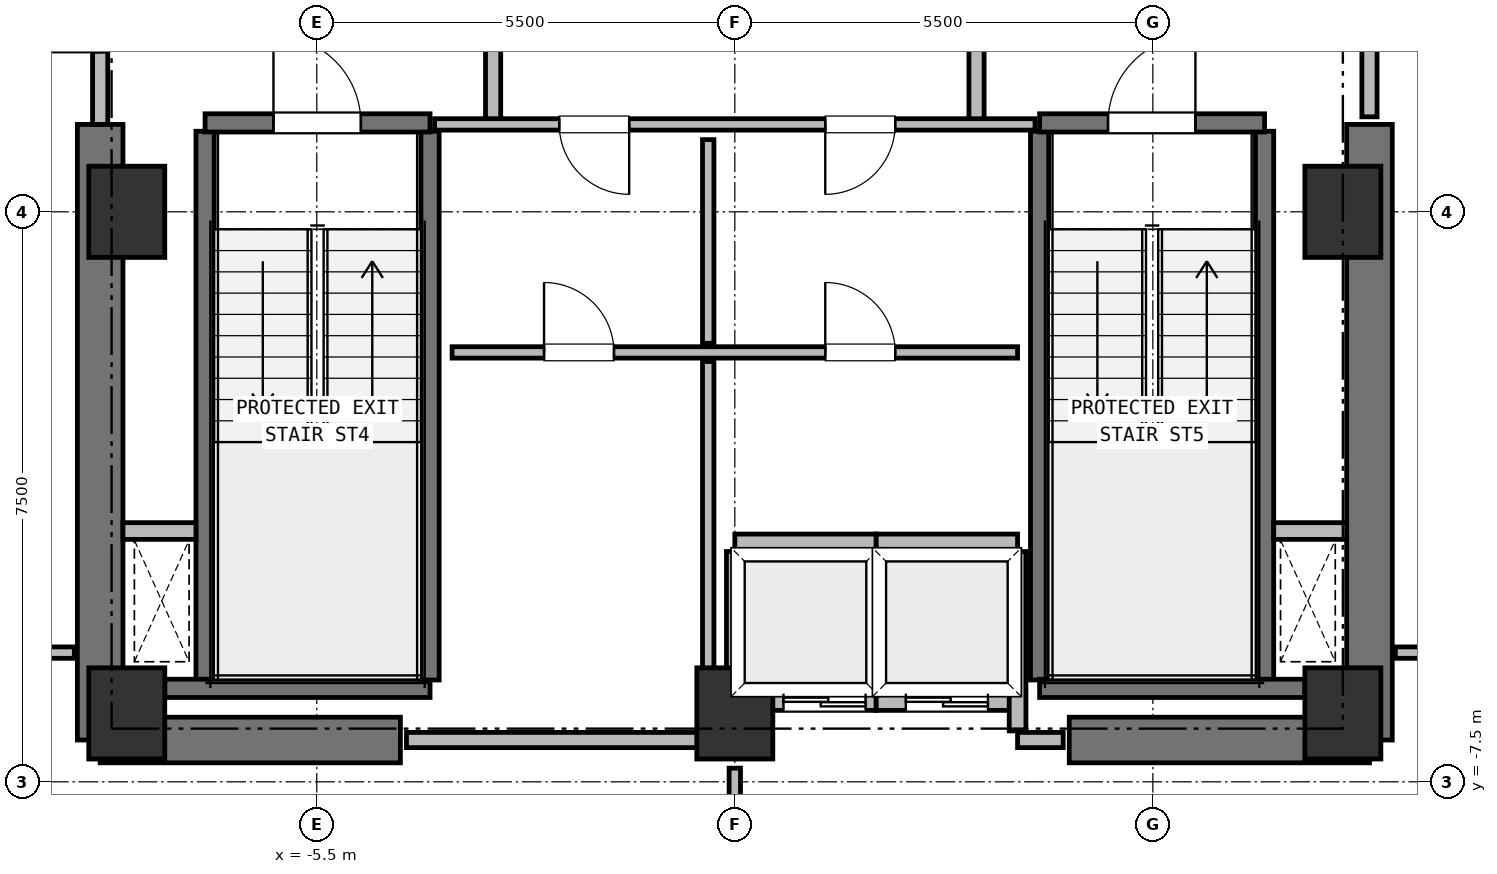
"""IFC4 building model, lengths in metres.
Left out: names, types, materials, properties, quantities, classifications, styles, units other than length and angle.
Written with IfcOpenShell. Run it as: python <this file> out.ifc"""

import sys

from ifc_helpers import new_model, si_unit, direction, frame, frame_2d, origin, origin_2d, place, context, subcontext, project, spatial, rectangle, extrude, element, fill, save


model = new_model("IFC4")
c1 = context("Model", 3, precision=1e-05, world=origin(), true_north=direction((0.0, 1.0)))
c2 = subcontext(c1, "Body", "Model", "MODEL_VIEW")
j1 = project(units=[si_unit("LENGTHUNIT", "METRE"), si_unit("PLANEANGLEUNIT", "RADIAN")], contexts=[c1])
p1 = place(None, origin())
s1 = spatial("IfcSite", under=j1, at=p1, CompositionType="ELEMENT")
p2 = place(p1, origin())
s2 = spatial("IfcBuilding", under=s1, at=p2, CompositionType="ELEMENT")
p3 = place(p2, frame((0.0, 0.0, 164.75)))
s3 = spatial("IfcBuildingStorey", under=s2, at=p3, CompositionType="ELEMENT", Elevation=164.75)
for number, where, z_axis, x_axis in (
    (1, (-8.0, -6.6, 0.0), (0.0, 0.0, 1.0), (1.0, 0.0, 0.0)),
    (2, (0.0, -6.6, 0.0), (0.0, 0.0, 1.0), (1.0, 0.0, 0.0)),
    (3, (8.0, -6.6, 0.0), (0.0, 0.0, 1.0), (1.0, 0.0, 0.0)),
    (4, (8.0, 0.0, 0.0), (0.0, 0.0, 1.0), (1.0, 0.0, 0.0)),
    (5, (-8.0, 0.0, 0.0), (0.0, 0.0, 1.0), (1.0, 0.0, 0.0)),
):
    element("IfcColumn", number, at=place(p3, frame(where, z_axis=z_axis, x_axis=x_axis)), inside=s3, PredefinedType="COLUMN", context=c2, shape_type="SweptSolid", body=[
        extrude(rectangle(XDim=1.0, YDim=1.2, at=origin_2d()), origin(), (0.0, 0.0, 1.0), 3.75),
    ])
for number, where, z_axis, x_axis in (
    (6, (-8.35, -6.95, 0.0), (0.0, 0.0, 1.0), (1.0, 0.0, 0.0)),
    (7, (4.4, -6.95, 0.0), (0.0, 0.0, 1.0), (1.0, 0.0, 0.0)),
):
    element("IfcWall", number, at=place(p3, frame(where, z_axis=z_axis, x_axis=x_axis)), inside=s3, PredefinedType="SHEAR", context=c2, shape_type="SweptSolid", body=[
        extrude(rectangle(XDim=3.95, YDim=0.6, at=frame_2d((1.975, 0.0))), origin(), (0.0, 0.0, 1.0), 3.44),
    ])
for number, where, z_axis, x_axis in (
    (8, (-8.35, -6.95, 0.0), (0.0, 0.0, 1.0), (0.0, 1.0, 0.0)),
    (9, (8.35, -6.95, 0.0), (0.0, 0.0, 1.0), (0.0, 1.0, 0.0)),
):
    element("IfcWall", number, at=place(p3, frame(where, z_axis=z_axis, x_axis=x_axis)), inside=s3, PredefinedType="SHEAR", context=c2, shape_type="SweptSolid", body=[
        extrude(rectangle(XDim=8.1, YDim=0.6, at=frame_2d((4.05, 0.0))), origin(), (0.0, 0.0, 1.0), 3.44),
    ])
p4 = place(p3, frame((-6.97, -6.16, 0.0), z_axis=(0.0, 0.0, 1.0), x_axis=(0.0, 1.0, 0.0)))
e10 = element("IfcWall", 10, at=p4, inside=s3, PredefinedType="SHEAR", context=c2, shape_type="SweptSolid", body=[
    extrude(rectangle(XDim=7.22, YDim=0.24, at=frame_2d((3.61, 0.0))), origin(), (0.0, 0.0, 1.0), 3.44),
])
p5 = place(p3, frame((-7.5, -6.27, 0.0), z_axis=(0.0, 0.0, 1.0), x_axis=(1.0, 0.0, 0.0)))
e11 = element("IfcWall", 11, at=p5, inside=s3, PredefinedType="SHEAR", context=c2, shape_type="SweptSolid", body=[
    extrude(rectangle(XDim=3.49, YDim=0.24, at=frame_2d((1.745, 0.0))), origin(), (0.0, 0.0, 1.0), 3.44),
])
p6 = place(p3, frame((-4.01, -6.16, 0.0), z_axis=(0.0, 0.0, 1.0), x_axis=(0.0, 1.0, 0.0)))
e12 = element("IfcWall", 12, at=p6, inside=s3, PredefinedType="SHEAR", context=c2, shape_type="SweptSolid", body=[
    extrude(rectangle(XDim=7.22, YDim=0.24, at=frame_2d((3.61, 0.0))), origin(), (0.0, 0.0, 1.0), 3.44),
])
p7 = place(p3, frame((-6.97, 1.17, 0.0), z_axis=(0.0, 0.0, 1.0), x_axis=(1.0, 0.0, 0.0)))
e13 = element("IfcWall", 13, at=p7, inside=s3, PredefinedType="SHEAR", context=c2, shape_type="SweptSolid", body=[
    extrude(rectangle(XDim=2.96, YDim=0.24, at=frame_2d((1.48, 0.0))), origin(), (0.0, 0.0, 1.0), 3.44),
])
p8 = place(p7, frame((0.9, 0.0, 0.0)))
e14 = element("IfcOpeningElement", 14, at=p8, cuts=e13, PredefinedType="OPENING", context=c2, shape_type="SweptSolid", body=[
    extrude(rectangle(XDim=1.15, YDim=2.15, at=frame_2d((0.575, 1.075))), frame((0.0, 0.13, 0.0), z_axis=(0.0, -1.0, 0.0), x_axis=(1.0, 0.0, 0.0)), (0.0, 0.0, 1.0), 0.26),
])
for number, where, z_axis, x_axis in (
    (15, (4.01, -6.16, 0.0), (0.0, 0.0, 1.0), (0.0, 1.0, 0.0)),
    (16, (6.97, -6.16, 0.0), (0.0, 0.0, 1.0), (0.0, 1.0, 0.0)),
):
    element("IfcWall", number, at=place(p3, frame(where, z_axis=z_axis, x_axis=x_axis)), inside=s3, PredefinedType="SHEAR", context=c2, shape_type="SweptSolid", body=[
        extrude(rectangle(XDim=7.22, YDim=0.24, at=frame_2d((3.61, 0.0))), origin(), (0.0, 0.0, 1.0), 3.44),
    ])
p9 = place(p3, frame((4.01, -6.27, 0.0), z_axis=(0.0, 0.0, 1.0), x_axis=(1.0, 0.0, 0.0)))
e17 = element("IfcWall", 17, at=p9, inside=s3, PredefinedType="SHEAR", context=c2, shape_type="SweptSolid", body=[
    extrude(rectangle(XDim=3.49, YDim=0.24, at=frame_2d((1.745, 0.0))), origin(), (0.0, 0.0, 1.0), 3.44),
])
p10 = place(p3, frame((4.01, 1.17, 0.0), z_axis=(0.0, 0.0, 1.0), x_axis=(1.0, 0.0, 0.0)))
e18 = element("IfcWall", 18, at=p10, inside=s3, PredefinedType="SHEAR", context=c2, shape_type="SweptSolid", body=[
    extrude(rectangle(XDim=2.96, YDim=0.24, at=frame_2d((1.48, 0.0))), origin(), (0.0, 0.0, 1.0), 3.44),
])
p11 = place(p10, frame((0.9, 0.0, 0.0)))
e19 = element("IfcOpeningElement", 19, at=p11, cuts=e18, PredefinedType="OPENING", context=c2, shape_type="SweptSolid", body=[
    extrude(rectangle(XDim=1.15, YDim=2.15, at=frame_2d((0.575, 1.075))), frame((0.0, 0.13, 0.0), z_axis=(0.0, -1.0, 0.0), x_axis=(1.0, 0.0, 0.0)), (0.0, 0.0, 1.0), 0.26),
])
for number, where, z_axis, x_axis in (
    (20, (-8.05, -4.2, 0.0), (0.0, 0.0, 1.0), (1.0, 0.0, 0.0)),
    (21, (7.09, -4.2, 0.0), (0.0, 0.0, 1.0), (1.0, 0.0, 0.0)),
):
    element("IfcWall", number, at=place(p3, frame(where, z_axis=z_axis, x_axis=x_axis)), inside=s3, PredefinedType="PARTITIONING", context=c2, shape_type="SweptSolid", body=[
        extrude(rectangle(XDim=0.96, YDim=0.22, at=frame_2d((0.48, 0.0))), origin(), (0.0, 0.0, 1.0), 3.44),
    ])
p12 = place(p3, frame((0.0, -6.45, 0.0), z_axis=(0.0, 0.0, 1.0), x_axis=(1.0, 0.0, 0.0)))
e22 = element("IfcWall", 22, at=p12, inside=s3, PredefinedType="PARTITIONING", context=c2, shape_type="SweptSolid", body=[
    extrude(rectangle(XDim=1.86, YDim=0.22, at=frame_2d((0.93, 0.0))), origin(), (0.0, 0.0, 1.0), 3.06),
])
p13 = place(p12, frame((0.64, 0.0, 0.0)))
e23 = element("IfcOpeningElement", 23, at=p13, cuts=e22, PredefinedType="OPENING", context=c2, shape_type="SweptSolid", body=[
    extrude(rectangle(XDim=1.08, YDim=2.15, at=frame_2d((0.54, 1.075))), frame((0.0, 0.12, 0.0), z_axis=(0.0, -1.0, 0.0), x_axis=(1.0, 0.0, 0.0)), (0.0, 0.0, 1.0), 0.24),
])
for number, where, z_axis, x_axis in (
    (24, (0.0, -4.35, 0.0), (0.0, 0.0, 1.0), (1.0, 0.0, 0.0)),
    (25, (0.0, -6.33, 0.0), (0.0, 0.0, 1.0), (0.0, 1.0, 0.0)),
    (26, (1.86, -6.33, 0.0), (0.0, 0.0, 1.0), (0.0, 1.0, 0.0)),
):
    element("IfcWall", number, at=place(p3, frame(where, z_axis=z_axis, x_axis=x_axis)), inside=s3, PredefinedType="PARTITIONING", context=c2, shape_type="SweptSolid", body=[
        extrude(rectangle(XDim=1.86, YDim=0.22, at=frame_2d((0.93, 0.0))), origin(), (0.0, 0.0, 1.0), 3.44),
    ])
p14 = place(p3, frame((1.86, -6.45, 0.0), z_axis=(0.0, 0.0, 1.0), x_axis=(1.0, 0.0, 0.0)))
e27 = element("IfcWall", 27, at=p14, inside=s3, PredefinedType="PARTITIONING", context=c2, shape_type="SweptSolid", body=[
    extrude(rectangle(XDim=1.86, YDim=0.22, at=frame_2d((0.93, 0.0))), origin(), (0.0, 0.0, 1.0), 3.06),
])
p15 = place(p14, frame((0.39, 0.0, 0.0)))
e28 = element("IfcOpeningElement", 28, at=p15, cuts=e27, PredefinedType="OPENING", context=c2, shape_type="SweptSolid", body=[
    extrude(rectangle(XDim=1.08, YDim=2.15, at=frame_2d((0.54, 1.075))), frame((0.0, 0.12, 0.0), z_axis=(0.0, -1.0, 0.0), x_axis=(1.0, 0.0, 0.0)), (0.0, 0.0, 1.0), 0.24),
])
p16 = place(p3, frame((1.86, -4.35, 0.0), z_axis=(0.0, 0.0, 1.0), x_axis=(1.0, 0.0, 0.0)))
e29 = element("IfcWall", 29, at=p16, inside=s3, PredefinedType="PARTITIONING", context=c2, shape_type="SweptSolid", body=[
    extrude(rectangle(XDim=1.86, YDim=0.22, at=frame_2d((0.93, 0.0))), origin(), (0.0, 0.0, 1.0), 3.44),
])
p17 = place(p3, frame((3.72, -6.83, 0.0), z_axis=(0.0, 0.0, 1.0), x_axis=(0.0, 1.0, 0.0)))
e30 = element("IfcWall", 30, at=p17, inside=s3, PredefinedType="PARTITIONING", context=c2, shape_type="SweptSolid", body=[
    extrude(rectangle(XDim=2.36, YDim=0.22, at=frame_2d((1.18, 0.0))), origin(), (0.0, 0.0, 1.0), 3.44),
])
p18 = place(p3, frame((-3.18, 1.15, 0.0), z_axis=(0.0, 0.0, 1.0), x_axis=(0.0, 1.0, 0.0)))
e31 = element("IfcWall", 31, at=p18, inside=s3, PredefinedType="PARTITIONING", context=c2, shape_type="SweptSolid", body=[
    extrude(rectangle(XDim=3.3, YDim=0.2, at=frame_2d((1.65, 0.0))), origin(), (0.0, 0.0, 1.0), 3.44),
])
p19 = place(p18, frame((1.08, 0.0, 0.0)))
e32 = element("IfcOpeningElement", 32, at=p19, cuts=e31, PredefinedType="OPENING", context=c2, shape_type="SweptSolid", body=[
    extrude(rectangle(XDim=1.15, YDim=2.15, at=frame_2d((0.575, 1.075))), frame((0.0, 0.11, 0.0), z_axis=(0.0, -1.0, 0.0), x_axis=(1.0, 0.0, 0.0)), (0.0, 0.0, 1.0), 0.22),
])
p20 = place(p3, frame((3.18, 1.15, 0.0), z_axis=(0.0, 0.0, 1.0), x_axis=(0.0, 1.0, 0.0)))
e33 = element("IfcWall", 33, at=p20, inside=s3, PredefinedType="PARTITIONING", context=c2, shape_type="SweptSolid", body=[
    extrude(rectangle(XDim=3.3, YDim=0.2, at=frame_2d((1.65, 0.0))), origin(), (0.0, 0.0, 1.0), 3.44),
])
p21 = place(p20, frame((1.08, 0.0, 0.0)))
e34 = element("IfcOpeningElement", 34, at=p21, cuts=e33, PredefinedType="OPENING", context=c2, shape_type="SweptSolid", body=[
    extrude(rectangle(XDim=1.15, YDim=2.15, at=frame_2d((0.575, 1.075))), frame((0.0, 0.11, 0.0), z_axis=(0.0, -1.0, 0.0), x_axis=(1.0, 0.0, 0.0)), (0.0, 0.0, 1.0), 0.22),
])
p22 = place(p3, frame((-8.35, 1.15, 0.0), z_axis=(0.0, 0.0, 1.0), x_axis=(0.0, 1.0, 0.0)))
e35 = element("IfcWall", 35, at=p22, inside=s3, PredefinedType="PARTITIONING", context=c2, shape_type="SweptSolid", body=[
    extrude(rectangle(XDim=5.4, YDim=0.2, at=frame_2d((2.7, 0.0))), origin(), (0.0, 0.0, 1.0), 3.44),
])
p23 = place(p22, frame((0.95, 0.0, 0.0)))
e36 = element("IfcOpeningElement", 36, at=p23, cuts=e35, PredefinedType="OPENING", context=c2, shape_type="SweptSolid", body=[
    extrude(rectangle(XDim=1.15, YDim=2.15, at=frame_2d((0.575, 1.075))), frame((0.0, 0.11, 0.0), z_axis=(0.0, -1.0, 0.0), x_axis=(1.0, 0.0, 0.0)), (0.0, 0.0, 1.0), 0.22),
])
p24 = place(p3, frame((8.35, 1.25, 0.0), z_axis=(0.0, 0.0, 1.0), x_axis=(0.0, 1.0, 0.0)))
e37 = element("IfcWall", 37, at=p24, inside=s3, PredefinedType="PARTITIONING", context=c2, shape_type="SweptSolid", body=[
    extrude(rectangle(XDim=5.3, YDim=0.2, at=frame_2d((2.65, 0.0))), origin(), (0.0, 0.0, 1.0), 3.44),
])
p25 = place(p24, frame((0.95, 0.0, 0.0)))
e38 = element("IfcOpeningElement", 38, at=p25, cuts=e37, PredefinedType="OPENING", context=c2, shape_type="SweptSolid", body=[
    extrude(rectangle(XDim=1.15, YDim=2.15, at=frame_2d((0.575, 1.075))), frame((0.0, 0.11, 0.0), z_axis=(0.0, -1.0, 0.0), x_axis=(1.0, 0.0, 0.0)), (0.0, 0.0, 1.0), 0.22),
])
p26 = place(p3, frame((3.95, 1.15, 0.0), z_axis=(0.0, 0.0, 1.0), x_axis=(-1.0, 0.0, 0.0)))
e39 = element("IfcWall", 39, at=p26, inside=s3, PredefinedType="PARTITIONING", context=c2, shape_type="SweptSolid", body=[
    extrude(rectangle(XDim=7.9, YDim=0.15, at=frame_2d((3.95, 0.0))), origin(), (0.0, 0.0, 1.0), 3.44),
])
p27 = place(p26, frame((5.34, 0.0, 0.0)))
e40 = element("IfcOpeningElement", 40, at=p27, cuts=e39, PredefinedType="OPENING", context=c2, shape_type="SweptSolid", body=[
    extrude(rectangle(XDim=0.92, YDim=2.05, at=frame_2d((0.46, 1.025))), frame((0.0, 0.085, 0.0), z_axis=(0.0, -1.0, 0.0), x_axis=(1.0, 0.0, 0.0)), (0.0, 0.0, 1.0), 0.17),
])
p28 = place(p26, frame((1.84, 0.0, 0.0)))
e41 = element("IfcOpeningElement", 41, at=p28, cuts=e39, PredefinedType="OPENING", context=c2, shape_type="SweptSolid", body=[
    extrude(rectangle(XDim=0.92, YDim=2.05, at=frame_2d((0.46, 1.025))), frame((0.0, 0.085, 0.0), z_axis=(0.0, -1.0, 0.0), x_axis=(1.0, 0.0, 0.0)), (0.0, 0.0, 1.0), 0.17),
])
p29 = place(p3, frame((-4.32, -6.95, 0.0), z_axis=(0.0, 0.0, 1.0), x_axis=(1.0, 0.0, 0.0)))
e42 = element("IfcWall", 42, at=p29, inside=s3, PredefinedType="PARTITIONING", context=c2, shape_type="SweptSolid", body=[
    extrude(rectangle(XDim=4.32, YDim=0.2, at=frame_2d((2.16, 0.0))), origin(), (0.0, 0.0, 1.0), 3.44),
])
p30 = place(p3, frame((3.72, -6.95, 0.0), z_axis=(0.0, 0.0, 1.0), x_axis=(1.0, 0.0, 0.0)))
e43 = element("IfcWall", 43, at=p30, inside=s3, PredefinedType="PARTITIONING", context=c2, shape_type="SweptSolid", body=[
    extrude(rectangle(XDim=0.6, YDim=0.2, at=frame_2d((0.3, 0.0))), origin(), (0.0, 0.0, 1.0), 3.44),
])
p31 = place(p3, frame((-3.72, -1.85, 0.0), z_axis=(0.0, 0.0, 1.0), x_axis=(1.0, 0.0, 0.0)))
e44 = element("IfcWall", 44, at=p31, inside=s3, PredefinedType="PARTITIONING", context=c2, shape_type="SweptSolid", body=[
    extrude(rectangle(XDim=7.44, YDim=0.15, at=frame_2d((3.72, 0.0))), origin(), (0.0, 0.0, 1.0), 3.44),
])
p32 = place(p31, frame((1.21, 0.0, 0.0)))
e45 = element("IfcOpeningElement", 45, at=p32, cuts=e44, PredefinedType="OPENING", context=c2, shape_type="SweptSolid", body=[
    extrude(rectangle(XDim=0.92, YDim=2.05, at=frame_2d((0.46, 1.025))), frame((0.0, 0.085, 0.0), z_axis=(0.0, -1.0, 0.0), x_axis=(1.0, 0.0, 0.0)), (0.0, 0.0, 1.0), 0.17),
])
p33 = place(p31, frame((4.91, 0.0, 0.0)))
e46 = element("IfcOpeningElement", 46, at=p33, cuts=e44, PredefinedType="OPENING", context=c2, shape_type="SweptSolid", body=[
    extrude(rectangle(XDim=0.92, YDim=2.05, at=frame_2d((0.46, 1.025))), frame((0.0, 0.085, 0.0), z_axis=(0.0, -1.0, 0.0), x_axis=(1.0, 0.0, 0.0)), (0.0, 0.0, 1.0), 0.17),
])
p34 = place(p3, frame((-0.35, -6.58, 0.0), z_axis=(0.0, 0.0, 1.0), x_axis=(0.0, 1.0, 0.0)))
e47 = element("IfcWall", 47, at=p34, inside=s3, PredefinedType="PARTITIONING", context=c2, shape_type="SweptSolid", body=[
    extrude(rectangle(XDim=4.61, YDim=0.15, at=frame_2d((2.305, 0.0))), origin(), (0.0, 0.0, 1.0), 3.44),
])
p35 = place(p3, frame((-0.35, -1.73, 0.0), z_axis=(0.0, 0.0, 1.0), x_axis=(0.0, 1.0, 0.0)))
e48 = element("IfcWall", 48, at=p35, inside=s3, PredefinedType="PARTITIONING", context=c2, shape_type="SweptSolid", body=[
    extrude(rectangle(XDim=2.68, YDim=0.15, at=frame_2d((1.34, 0.0))), origin(), (0.0, 0.0, 1.0), 3.44),
])
p36 = place(p3, frame((-8.69, -5.8, 0.0), z_axis=(0.0, 0.0, 1.0), x_axis=(-1.0, 0.0, 0.0)))
e49 = element("IfcWall", 49, at=p36, inside=s3, PredefinedType="PARTITIONING", context=c2, shape_type="SweptSolid", body=[
    extrude(rectangle(XDim=2.02, YDim=0.15, at=frame_2d((1.01, 0.0))), origin(), (0.0, 0.0, 1.0), 3.44),
])
p37 = place(p36, frame((0.55, 0.0, 0.0)))
e50 = element("IfcOpeningElement", 50, at=p37, cuts=e49, PredefinedType="OPENING", context=c2, shape_type="SweptSolid", body=[
    extrude(rectangle(XDim=1.0, YDim=2.15, at=frame_2d((0.5, 1.075))), frame((0.0, 0.085, 0.0), z_axis=(0.0, -1.0, 0.0), x_axis=(1.0, 0.0, 0.0)), (0.0, 0.0, 1.0), 0.17),
])
p38 = place(p3, frame((10.71, -5.8, 0.0), z_axis=(0.0, 0.0, 1.0), x_axis=(-1.0, 0.0, 0.0)))
e51 = element("IfcWall", 51, at=p38, inside=s3, PredefinedType="PARTITIONING", context=c2, shape_type="SweptSolid", body=[
    extrude(rectangle(XDim=2.02, YDim=0.15, at=frame_2d((1.01, 0.0))), origin(), (0.0, 0.0, 1.0), 3.44),
])
p39 = place(p38, frame((0.55, 0.0, 0.0)))
e52 = element("IfcOpeningElement", 52, at=p39, cuts=e51, PredefinedType="OPENING", context=c2, shape_type="SweptSolid", body=[
    extrude(rectangle(XDim=1.0, YDim=2.15, at=frame_2d((0.5, 1.075))), frame((0.0, 0.085, 0.0), z_axis=(0.0, -1.0, 0.0), x_axis=(1.0, 0.0, 0.0)), (0.0, 0.0, 1.0), 0.17),
])
p40 = place(p3, frame((0.0, -7.32, 0.0), z_axis=(0.0, 0.0, 1.0), x_axis=(0.0, -1.0, 0.0)))
e53 = element("IfcWall", 53, at=p40, inside=s3, PredefinedType="PARTITIONING", context=c2, shape_type="SweptSolid", body=[
    extrude(rectangle(XDim=13.287, YDim=0.15, at=frame_2d((6.644, 0.0))), origin(), (0.0, 0.0, 1.0), 3.44),
])
p41 = place(p8, origin())
e54 = element("IfcDoor", 54, at=p41, inside=s3, OperationType="SINGLE_SWING_LEFT", PredefinedType="DOOR", context=c2, shape_type="SweptSolid", body=[
    extrude(rectangle(XDim=1.15, YDim=2.15, at=frame_2d((0.575, 1.075))), frame((0.0, 0.025, 0.0), z_axis=(0.0, -1.0, 0.0), x_axis=(1.0, 0.0, 0.0)), (0.0, 0.0, 1.0), 0.05),
])
fill(e14, e54)
p42 = place(p11, origin())
e55 = element("IfcDoor", 55, at=p42, inside=s3, OperationType="SINGLE_SWING_RIGHT", PredefinedType="DOOR", context=c2, shape_type="SweptSolid", body=[
    extrude(rectangle(XDim=1.15, YDim=2.15, at=frame_2d((0.575, 1.075))), frame((0.0, 0.025, 0.0), z_axis=(0.0, -1.0, 0.0), x_axis=(1.0, 0.0, 0.0)), (0.0, 0.0, 1.0), 0.05),
])
fill(e19, e55)
p43 = place(p13, origin())
e56 = element("IfcDoor", 56, at=p43, inside=s3, OperationType="DOUBLE_DOOR_SLIDING", PredefinedType="DOOR", context=c2, shape_type="SweptSolid", body=[
    extrude(rectangle(XDim=1.08, YDim=2.15, at=frame_2d((0.54, 1.075))), frame((0.0, 0.025, 0.0), z_axis=(0.0, -1.0, 0.0), x_axis=(1.0, 0.0, 0.0)), (0.0, 0.0, 1.0), 0.05),
])
fill(e23, e56)
p44 = place(p15, origin())
e57 = element("IfcDoor", 57, at=p44, inside=s3, OperationType="DOUBLE_DOOR_SLIDING", PredefinedType="DOOR", context=c2, shape_type="SweptSolid", body=[
    extrude(rectangle(XDim=1.08, YDim=2.15, at=frame_2d((0.54, 1.075))), frame((0.0, 0.025, 0.0), z_axis=(0.0, -1.0, 0.0), x_axis=(1.0, 0.0, 0.0)), (0.0, 0.0, 1.0), 0.05),
])
fill(e28, e57)
p45 = place(p23, origin())
e58 = element("IfcDoor", 58, at=p45, inside=s3, OperationType="SINGLE_SWING_LEFT", PredefinedType="DOOR", context=c2, shape_type="SweptSolid", body=[
    extrude(rectangle(XDim=1.15, YDim=2.15, at=frame_2d((0.575, 1.075))), frame((0.0, 0.025, 0.0), z_axis=(0.0, -1.0, 0.0), x_axis=(1.0, 0.0, 0.0)), (0.0, 0.0, 1.0), 0.05),
])
fill(e36, e58)
p46 = place(p27, origin())
e59 = element("IfcDoor", 59, at=p46, inside=s3, OperationType="SINGLE_SWING_LEFT", PredefinedType="DOOR", context=c2, shape_type="SweptSolid", body=[
    extrude(rectangle(XDim=0.92, YDim=2.05, at=frame_2d((0.46, 1.025))), frame((0.0, 0.025, 0.0), z_axis=(0.0, -1.0, 0.0), x_axis=(1.0, 0.0, 0.0)), (0.0, 0.0, 1.0), 0.05),
])
fill(e40, e59)
p47 = place(p28, origin())
e60 = element("IfcDoor", 60, at=p47, inside=s3, OperationType="SINGLE_SWING_RIGHT", PredefinedType="DOOR", context=c2, shape_type="SweptSolid", body=[
    extrude(rectangle(XDim=0.92, YDim=2.05, at=frame_2d((0.46, 1.025))), frame((0.0, 0.025, 0.0), z_axis=(0.0, -1.0, 0.0), x_axis=(1.0, 0.0, 0.0)), (0.0, 0.0, 1.0), 0.05),
])
fill(e41, e60)
p48 = place(p32, origin())
e61 = element("IfcDoor", 61, at=p48, inside=s3, OperationType="SINGLE_SWING_LEFT", PredefinedType="DOOR", context=c2, shape_type="SweptSolid", body=[
    extrude(rectangle(XDim=0.92, YDim=2.05, at=frame_2d((0.46, 1.025))), frame((0.0, 0.025, 0.0), z_axis=(0.0, -1.0, 0.0), x_axis=(1.0, 0.0, 0.0)), (0.0, 0.0, 1.0), 0.05),
])
fill(e45, e61)
p49 = place(p33, origin())
e62 = element("IfcDoor", 62, at=p49, inside=s3, OperationType="SINGLE_SWING_LEFT", PredefinedType="DOOR", context=c2, shape_type="SweptSolid", body=[
    extrude(rectangle(XDim=0.92, YDim=2.05, at=frame_2d((0.46, 1.025))), frame((0.0, 0.025, 0.0), z_axis=(0.0, -1.0, 0.0), x_axis=(1.0, 0.0, 0.0)), (0.0, 0.0, 1.0), 0.05),
])
fill(e46, e62)
save(model, sys.argv[1])
